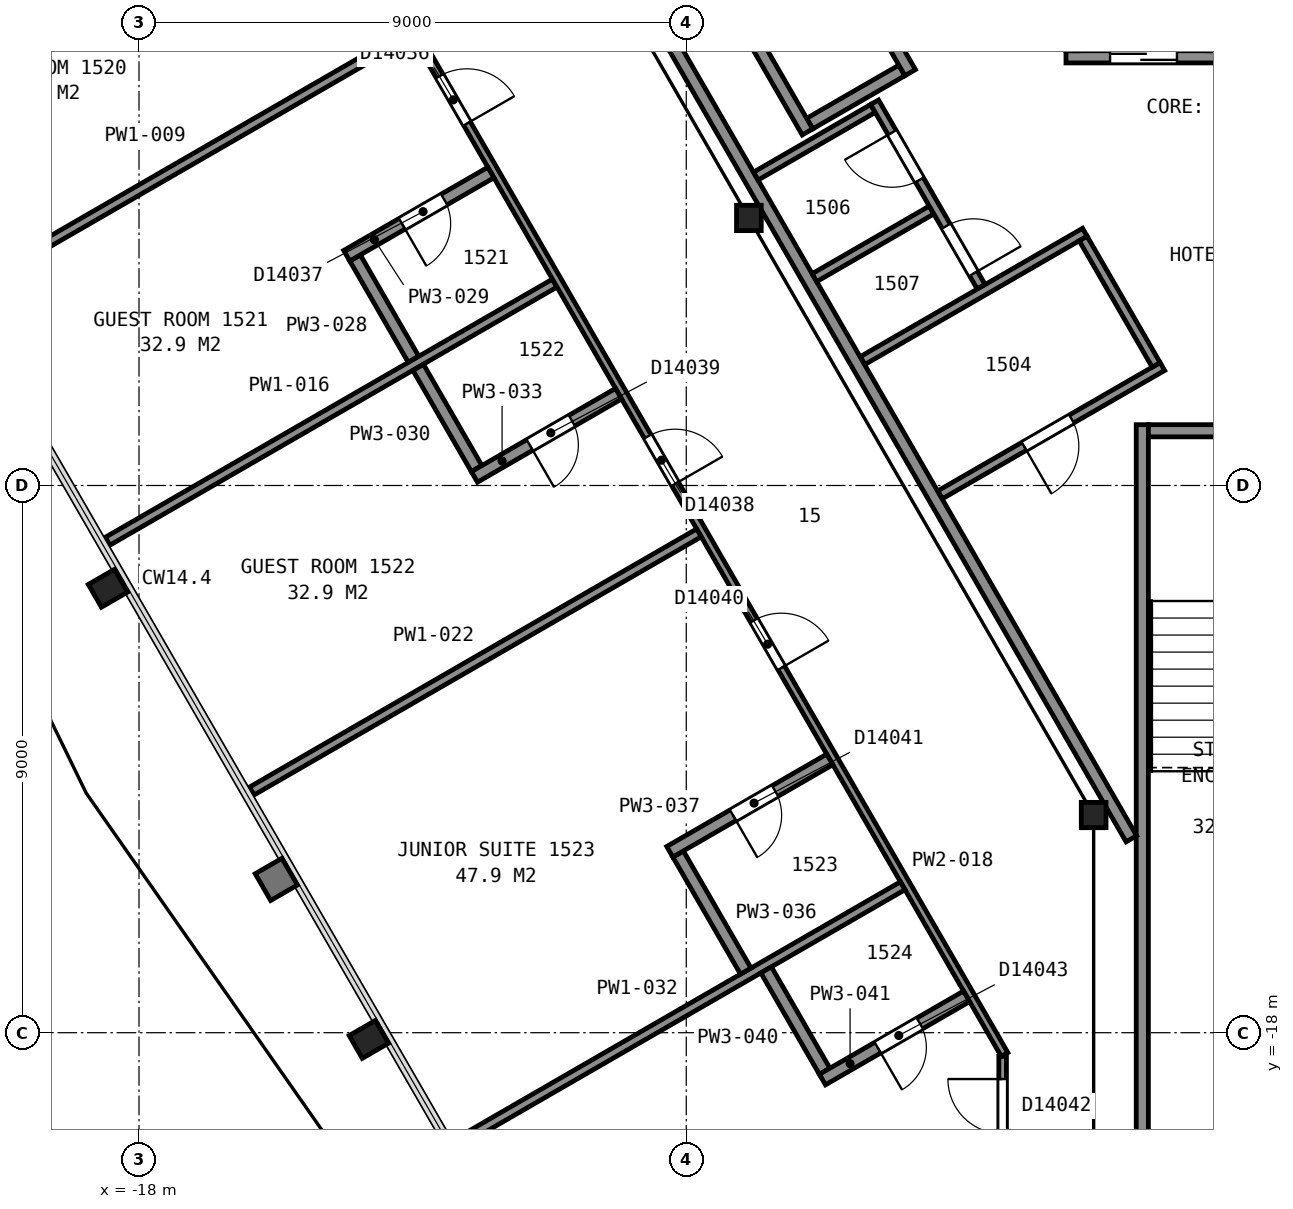
"""IFC4 building model, lengths in metres.
Left out: names, types, materials, properties, quantities, classifications, styles, units other than length and angle.
Written with IfcOpenShell. Run it as: python <this file> out.ifc"""

import sys

from ifc_helpers import new_model, si_unit, direction, frame, frame_2d, origin, origin_2d, place, context, subcontext, project, spatial, rectangle, i_section, extrude, element, fill, save


model = new_model("IFC4")
c1 = context("Model", 3, precision=1e-05, world=origin(), true_north=direction((0.0, 1.0)))
c2 = subcontext(c1, "Body", "Model", "MODEL_VIEW")
j1 = project(units=[si_unit("LENGTHUNIT", "METRE"), si_unit("PLANEANGLEUNIT", "RADIAN")], contexts=[c1])
p1 = place(None, origin())
s1 = spatial("IfcSite", under=j1, at=p1, CompositionType="ELEMENT")
p2 = place(p1, origin())
s2 = spatial("IfcBuilding", under=s1, at=p2, CompositionType="ELEMENT")
p3 = place(p2, frame((0.0, 0.0, 69.2)))
s3 = spatial("IfcBuildingStorey", under=s2, at=p3, CompositionType="ELEMENT", Elevation=69.2)
for number, where, z_axis, x_axis in (
    (1, (-18.51, -10.69, 0.0), (0.0, 0.0, 1.0), (-0.5, 0.866, 0.0)),
    (2, (-14.22, -18.11, 0.0), (0.0, 0.0, 1.0), (-0.5, 0.866, 0.0)),
):
    element("IfcColumn", number, at=place(p3, frame(where, z_axis=z_axis, x_axis=x_axis)), inside=s3, PredefinedType="COLUMN", context=c2, shape_type="SweptSolid", body=[
        extrude(i_section(OverallWidth=0.432, OverallDepth=0.498, WebThickness=0.056, FlangeThickness=0.089, FilletRadius=0.015, at=origin_2d()), origin(), (0.0, 0.0, 1.0), 3.575),
    ])
for number, where, z_axis, x_axis in (
    (3, (-7.97, -4.6, 0.0), (0.0, 0.0, 1.0), (1.0, 0.0, 0.0)),
    (4, (-2.3, -14.42, 0.0), (0.0, 0.0, 1.0), (1.0, 0.0, 0.0)),
):
    element("IfcColumn", number, at=place(p3, frame(where, z_axis=z_axis, x_axis=x_axis)), inside=s3, PredefinedType="COLUMN", context=c2, shape_type="SweptSolid", body=[
        extrude(i_section(OverallWidth=0.406, OverallDepth=0.417, WebThickness=0.03, FlangeThickness=0.048, FilletRadius=0.015, at=origin_2d()), origin(), (0.0, 0.0, 1.0), 3.6),
    ])
p4 = place(p3, frame((-1.5, -8.0, 0.0), z_axis=(0.0, 0.0, 1.0), x_axis=(0.0, -1.0, 0.0)))
e5 = element("IfcWall", 5, at=p4, inside=s3, PredefinedType="PARTITIONING", context=c2, shape_type="SweptSolid", body=[
    extrude(rectangle(XDim=12.0, YDim=0.2, at=frame_2d((6.0, 0.0))), origin(), (0.0, 0.0, 1.0), 3.35),
])
p5 = place(p3, frame((-1.4, -8.1, 0.0), z_axis=(0.0, 0.0, 1.0), x_axis=(1.0, 0.0, 0.0)))
e6 = element("IfcWall", 6, at=p5, inside=s3, PredefinedType="PARTITIONING", context=c2, shape_type="SweptSolid", body=[
    extrude(rectangle(XDim=2.8, YDim=0.2, at=frame_2d((1.4, 0.0))), origin(), (0.0, 0.0, 1.0), 3.35),
])
p6 = place(p3, frame((-2.755, -1.95, 0.0), z_axis=(0.0, 0.0, 1.0), x_axis=(1.0, 0.0, 0.0)))
e7 = element("IfcWall", 7, at=p6, inside=s3, PredefinedType="PARTITIONING", context=c2, shape_type="SweptSolid", body=[
    extrude(rectangle(XDim=2.55, YDim=0.2, at=frame_2d((1.275, 0.0))), origin(), (0.0, 0.0, 1.0), 3.6),
])
p7 = place(p6, frame((0.725, 0.0, 0.0)))
e8 = element("IfcOpeningElement", 8, at=p7, cuts=e7, PredefinedType="OPENING", context=c2, shape_type="SweptSolid", body=[
    extrude(rectangle(XDim=1.1, YDim=2.1, at=frame_2d((0.55, 1.05))), frame((0.0, 0.11, 0.0), z_axis=(0.0, -1.0, 0.0), x_axis=(1.0, 0.0, 0.0)), (0.0, 0.0, 1.0), 0.22),
])
p8 = place(p3, frame((-6.97, -3.048, 0.0), z_axis=(0.0, 0.0, 1.0), x_axis=(0.866036909293, 0.499980071345, 0.0)))
e9 = element("IfcWall", 9, at=p8, inside=s3, PredefinedType="PARTITIONING", context=c2, shape_type="SweptSolid", body=[
    extrude(rectangle(XDim=1.75, YDim=0.2, at=frame_2d((0.875, 0.0))), origin(), (0.0, 0.0, 1.0), 3.6),
])
p9 = place(p3, frame((-5.318, -2.21, 0.0), z_axis=(0.0, 0.0, 1.0), x_axis=(-0.499938297808, 0.866061024631, 0.0)))
e10 = element("IfcWall", 10, at=p9, inside=s3, PredefinedType="PARTITIONING", context=c2, shape_type="SweptSolid", body=[
    extrude(rectangle(XDim=2.35, YDim=0.2, at=frame_2d((1.175, 0.0))), origin(), (0.0, 0.0, 1.0), 3.6),
])
p10 = place(p3, frame((-7.006, -3.185, 0.0), z_axis=(0.0, 0.0, 1.0), x_axis=(-0.499990435942, 0.866030925526, 0.0)))
e11 = element("IfcWall", 11, at=p10, inside=s3, PredefinedType="PARTITIONING", context=c2, shape_type="SweptSolid", body=[
    extrude(rectangle(XDim=2.55, YDim=0.2, at=frame_2d((1.275, 0.0))), origin(), (0.0, 0.0, 1.0), 3.6),
])
p11 = place(p3, frame((-13.664, 5.946, 0.0), z_axis=(0.0, 0.0, 1.0), x_axis=(0.499994327219, -0.866028678941, 0.0)))
e12 = element("IfcWall", 12, at=p11, inside=s3, PredefinedType="PARTITIONING", context=c2, shape_type="SweptSolid", body=[
    extrude(rectangle(XDim=23.968, YDim=0.2, at=frame_2d((11.984, 0.0))), origin(), (0.0, 0.0, 1.0), 3.35),
])
p12 = place(p3, frame((-7.856, -3.912, 0.0), z_axis=(0.0, 0.0, 1.0), x_axis=(0.865971748, 0.500092923031, 0.0)))
e13 = element("IfcWall", 13, at=p12, inside=s3, PredefinedType="PARTITIONING", context=c2, shape_type="SweptSolid", body=[
    extrude(rectangle(XDim=2.225, YDim=0.15, at=frame_2d((1.112, 0.0))), origin(), (0.0, 0.0, 1.0), 3.35),
])
p13 = place(p3, frame((-6.892, -5.582, 0.0), z_axis=(0.0, 0.0, 1.0), x_axis=(0.865944298464, 0.500140452231, 0.0)))
e14 = element("IfcWall", 14, at=p13, inside=s3, PredefinedType="PARTITIONING", context=c2, shape_type="SweptSolid", body=[
    extrude(rectangle(XDim=2.224, YDim=0.15, at=frame_2d((1.112, 0.0))), origin(), (0.0, 0.0, 1.0), 3.35),
])
p14 = place(p3, frame((-6.1, -6.946, 0.0), z_axis=(0.0, 0.0, 1.0), x_axis=(0.866038200431, 0.499977834903, 0.0)))
e15 = element("IfcWall", 15, at=p14, inside=s3, PredefinedType="PARTITIONING", context=c2, shape_type="SweptSolid", body=[
    extrude(rectangle(XDim=4.22, YDim=0.15, at=frame_2d((2.11, 0.0))), origin(), (0.0, 0.0, 1.0), 3.35),
])
p15 = place(p3, frame((-4.152, -5.729, 0.0), z_axis=(0.0, 0.0, 1.0), x_axis=(-0.500024287448, 0.866011380966, 0.0)))
e16 = element("IfcWall", 16, at=p15, inside=s3, PredefinedType="PARTITIONING", context=c2, shape_type="SweptSolid", body=[
    extrude(rectangle(XDim=3.501, YDim=0.15, at=frame_2d((1.75, 0.0))), origin(), (0.0, 0.0, 1.0), 3.35),
])
p16 = place(p15, frame((2.026, 0.0, 0.0)))
e17 = element("IfcOpeningElement", 17, at=p16, cuts=e16, PredefinedType="OPENING", context=c2, shape_type="SweptSolid", body=[
    extrude(rectangle(XDim=0.9, YDim=2.1, at=frame_2d((0.45, 1.05))), frame((0.0, 0.085, 0.0), z_axis=(0.0, -1.0, 0.0), x_axis=(1.0, 0.0, 0.0)), (0.0, 0.0, 1.0), 0.17),
])
p17 = place(p15, frame((0.248, 0.0, 0.0)))
e18 = element("IfcOpeningElement", 18, at=p17, cuts=e16, PredefinedType="OPENING", context=c2, shape_type="SweptSolid", body=[
    extrude(rectangle(XDim=0.9, YDim=2.1, at=frame_2d((0.45, 1.05))), frame((0.0, 0.085, 0.0), z_axis=(0.0, -1.0, 0.0), x_axis=(1.0, 0.0, 0.0)), (0.0, 0.0, 1.0), 0.17),
])
p18 = place(p3, frame((-4.825, -9.154, 0.0), z_axis=(0.0, 0.0, 1.0), x_axis=(0.866023738697, 0.500002884005, 0.0)))
e19 = element("IfcWall", 19, at=p18, inside=s3, PredefinedType="PARTITIONING", context=c2, shape_type="SweptSolid", body=[
    extrude(rectangle(XDim=4.22, YDim=0.15, at=frame_2d((2.11, 0.0))), origin(), (0.0, 0.0, 1.0), 3.35),
])
p19 = place(p18, frame((1.595, 0.0, 0.0)))
e20 = element("IfcOpeningElement", 20, at=p19, cuts=e19, PredefinedType="OPENING", context=c2, shape_type="SweptSolid", body=[
    extrude(rectangle(XDim=0.9, YDim=2.1, at=frame_2d((0.45, 1.05))), frame((0.0, 0.085, 0.0), z_axis=(0.0, -1.0, 0.0), x_axis=(1.0, 0.0, 0.0)), (0.0, 0.0, 1.0), 0.17),
])
p20 = place(p3, frame((-2.472, -4.938, 0.0), z_axis=(0.0, 0.0, 1.0), x_axis=(0.500045362686, -0.865999212041, 0.0)))
e21 = element("IfcWall", 21, at=p20, inside=s3, PredefinedType="PARTITIONING", context=c2, shape_type="SweptSolid", body=[
    extrude(rectangle(XDim=2.4, YDim=0.15, at=frame_2d((1.2, 0.0))), origin(), (0.0, 0.0, 1.0), 3.35),
])
p21 = place(p3, frame((-20.889, -5.809, 0.0), z_axis=(0.0, 0.0, 1.0), x_axis=(0.866022790583, 0.50000452617, 0.0)))
e22 = element("IfcWall", 22, at=p21, inside=s3, PredefinedType="PARTITIONING", context=c2, shape_type="SweptSolid", body=[
    extrude(rectangle(XDim=8.491, YDim=0.15, at=frame_2d((4.246, 0.0))), origin(), (0.0, 0.0, 1.0), 2.613),
])
p22 = place(p3, frame((-18.517, -9.917, 0.0), z_axis=(0.0, 0.0, 1.0), x_axis=(0.866017528739, 0.50001363973, 0.0)))
e23 = element("IfcWall", 23, at=p22, inside=s3, PredefinedType="PARTITIONING", context=c2, shape_type="SweptSolid", body=[
    extrude(rectangle(XDim=8.491, YDim=0.15, at=frame_2d((4.246, 0.0))), origin(), (0.0, 0.0, 1.0), 2.613),
])
p23 = place(p3, frame((-3.766, -18.358, 0.0), z_axis=(0.0, 0.0, 1.0), x_axis=(-0.500003973642, 0.866023109589, 0.0)))
e24 = element("IfcWall", 24, at=p23, inside=s3, PredefinedType="PARTITIONING", context=c2, shape_type="SweptSolid", body=[
    extrude(rectangle(XDim=28.826, YDim=0.125, at=frame_2d((14.413, 0.0))), origin(), (0.0, 0.0, 1.0), 2.613),
])
p24 = place(p23, frame((27.114, 0.0, 0.0)))
e25 = element("IfcOpeningElement", 25, at=p24, cuts=e24, PredefinedType="OPENING", context=c2, shape_type="SweptSolid", body=[
    extrude(rectangle(XDim=0.9, YDim=2.1, at=frame_2d((0.45, 1.05))), frame((0.0, 0.073, 0.0), z_axis=(0.0, -1.0, 0.0), x_axis=(1.0, 0.0, 0.0)), (0.0, 0.0, 1.0), 0.145),
])
p25 = place(p23, frame((20.322, 0.0, 0.0)))
e26 = element("IfcOpeningElement", 26, at=p25, cuts=e24, PredefinedType="OPENING", context=c2, shape_type="SweptSolid", body=[
    extrude(rectangle(XDim=0.9, YDim=2.1, at=frame_2d((0.45, 1.05))), frame((0.0, 0.073, 0.0), z_axis=(0.0, -1.0, 0.0), x_axis=(1.0, 0.0, 0.0)), (0.0, 0.0, 1.0), 0.145),
])
p26 = place(p23, frame((17.68, 0.0, 0.0)))
e27 = element("IfcOpeningElement", 27, at=p26, cuts=e24, PredefinedType="OPENING", context=c2, shape_type="SweptSolid", body=[
    extrude(rectangle(XDim=0.9, YDim=2.1, at=frame_2d((0.45, 1.05))), frame((0.0, 0.073, 0.0), z_axis=(0.0, -1.0, 0.0), x_axis=(1.0, 0.0, 0.0)), (0.0, 0.0, 1.0), 0.145),
])
p27 = place(p23, frame((10.836, 0.0, 0.0)))
e28 = element("IfcOpeningElement", 28, at=p27, cuts=e24, PredefinedType="OPENING", context=c2, shape_type="SweptSolid", body=[
    extrude(rectangle(XDim=0.9, YDim=2.1, at=frame_2d((0.45, 1.05))), frame((0.0, 0.073, 0.0), z_axis=(0.0, -1.0, 0.0), x_axis=(1.0, 0.0, 0.0)), (0.0, 0.0, 1.0), 0.145),
])
p28 = place(p23, frame((7.342, 0.0, 0.0)))
e29 = element("IfcOpeningElement", 29, at=p28, cuts=e24, PredefinedType="OPENING", context=c2, shape_type="SweptSolid", body=[
    extrude(rectangle(XDim=0.9, YDim=2.1, at=frame_2d((0.45, 1.05))), frame((0.0, 0.073, 0.0), z_axis=(0.0, -1.0, 0.0), x_axis=(1.0, 0.0, 0.0)), (0.0, 0.0, 1.0), 0.145),
])
p29 = place(p3, frame((-16.145, -14.025, 0.0), z_axis=(0.0, 0.0, 1.0), x_axis=(0.866024716685, 0.500001190089, 0.0)))
e30 = element("IfcWall", 30, at=p29, inside=s3, PredefinedType="PARTITIONING", context=c2, shape_type="SweptSolid", body=[
    extrude(rectangle(XDim=8.492, YDim=0.15, at=frame_2d((4.246, 0.0))), origin(), (0.0, 0.0, 1.0), 2.613),
])
p30 = place(p3, frame((-14.447, -5.258, 0.0), z_axis=(0.0, 0.0, 1.0), x_axis=(0.499667418833, -0.866217334482, 0.0)))
e31 = element("IfcWall", 31, at=p30, inside=s3, PredefinedType="PARTITIONING", context=c2, shape_type="SweptSolid", body=[
    extrude(rectangle(XDim=1.92, YDim=0.2, at=frame_2d((0.96, 0.0))), origin(), (0.0, 0.0, 1.0), 2.613),
])
p31 = place(p3, frame((-12.213, -3.852, 0.0), z_axis=(0.0, 0.0, 1.0), x_axis=(-0.866005850709, -0.50003386539, 0.0)))
e32 = element("IfcWall", 32, at=p31, inside=s3, PredefinedType="PARTITIONING", context=c2, shape_type="SweptSolid", body=[
    extrude(rectangle(XDim=2.737, YDim=0.2, at=frame_2d((1.369, 0.0))), origin(), (0.0, 0.0, 1.0), 2.613),
])
p32 = place(p31, frame((0.887, 0.0, 0.0)))
e33 = element("IfcOpeningElement", 33, at=p32, cuts=e32, PredefinedType="OPENING", context=c2, shape_type="SweptSolid", body=[
    extrude(rectangle(XDim=0.8, YDim=2.1, at=frame_2d((0.4, 1.05))), frame((0.0, 0.11, 0.0), z_axis=(0.0, -1.0, 0.0), x_axis=(1.0, 0.0, 0.0)), (0.0, 0.0, 1.0), 0.22),
])
p33 = place(p3, frame((-13.407, -7.059, 0.0), z_axis=(0.0, 0.0, 1.0), x_axis=(0.499993829411, -0.866028966346, 0.0)))
e34 = element("IfcWall", 34, at=p33, inside=s3, PredefinedType="PARTITIONING", context=c2, shape_type="SweptSolid", body=[
    extrude(rectangle(XDim=1.921, YDim=0.2, at=frame_2d((0.96, 0.0))), origin(), (0.0, 0.0, 1.0), 2.613),
])
p34 = place(p3, frame((-12.794, -19.829, 0.0), z_axis=(0.0, 0.0, 1.0), x_axis=(0.866024716685, 0.500001190089, 0.0)))
e35 = element("IfcWall", 35, at=p34, inside=s3, PredefinedType="PARTITIONING", context=c2, shape_type="SweptSolid", body=[
    extrude(rectangle(XDim=8.492, YDim=0.15, at=frame_2d((4.246, 0.0))), origin(), (0.0, 0.0, 1.0), 2.613),
])
p35 = place(p3, frame((-12.484, -8.859, 0.0), z_axis=(0.0, 0.0, 1.0), x_axis=(0.866028150195, 0.499995243048, 0.0)))
e36 = element("IfcWall", 36, at=p35, inside=s3, PredefinedType="PARTITIONING", context=c2, shape_type="SweptSolid", body=[
    extrude(rectangle(XDim=2.737, YDim=0.2, at=frame_2d((1.369, 0.0))), origin(), (0.0, 0.0, 1.0), 2.613),
])
p36 = place(p35, frame((1.05, 0.0, 0.0)))
e37 = element("IfcOpeningElement", 37, at=p36, cuts=e36, PredefinedType="OPENING", context=c2, shape_type="SweptSolid", body=[
    extrude(rectangle(XDim=0.8, YDim=2.1, at=frame_2d((0.4, 1.05))), frame((0.0, 0.11, 0.0), z_axis=(0.0, -1.0, 0.0), x_axis=(1.0, 0.0, 0.0)), (0.0, 0.0, 1.0), 0.22),
])
p37 = place(p3, frame((-9.134, -15.061, 0.0), z_axis=(0.0, 0.0, 1.0), x_axis=(0.500092923031, -0.865971748, 0.0)))
e38 = element("IfcWall", 38, at=p37, inside=s3, PredefinedType="PARTITIONING", context=c2, shape_type="SweptSolid", body=[
    extrude(rectangle(XDim=2.225, YDim=0.2, at=frame_2d((1.112, 0.0))), origin(), (0.0, 0.0, 1.0), 2.613),
])
p38 = place(p3, frame((-6.64, -13.505, 0.0), z_axis=(0.0, 0.0, 1.0), x_axis=(-0.866038344573, -0.499977585228, 0.0)))
e39 = element("IfcWall", 39, at=p38, inside=s3, PredefinedType="PARTITIONING", context=c2, shape_type="SweptSolid", body=[
    extrude(rectangle(XDim=3.037, YDim=0.2, at=frame_2d((1.519, 0.0))), origin(), (0.0, 0.0, 1.0), 2.613),
])
p39 = place(p38, frame((1.037, 0.0, 0.0)))
e40 = element("IfcOpeningElement", 40, at=p39, cuts=e39, PredefinedType="OPENING", context=c2, shape_type="SweptSolid", body=[
    extrude(rectangle(XDim=0.8, YDim=2.1, at=frame_2d((0.4, 1.05))), frame((0.0, 0.11, 0.0), z_axis=(0.0, -1.0, 0.0), x_axis=(1.0, 0.0, 0.0)), (0.0, 0.0, 1.0), 0.22),
])
p40 = place(p3, frame((-7.687, -16.967, 0.0), z_axis=(0.0, 0.0, 1.0), x_axis=(0.500026156197, -0.86601030197, 0.0)))
e41 = element("IfcWall", 41, at=p40, inside=s3, PredefinedType="PARTITIONING", context=c2, shape_type="SweptSolid", body=[
    extrude(rectangle(XDim=1.925, YDim=0.2, at=frame_2d((0.963, 0.0))), origin(), (0.0, 0.0, 1.0), 2.613),
])
p41 = place(p3, frame((-6.76, -18.771, 0.0), z_axis=(0.0, 0.0, 1.0), x_axis=(0.866005850709, 0.50003386539, 0.0)))
e42 = element("IfcWall", 42, at=p41, inside=s3, PredefinedType="PARTITIONING", context=c2, shape_type="SweptSolid", body=[
    extrude(rectangle(XDim=2.737, YDim=0.2, at=frame_2d((1.369, 0.0))), origin(), (0.0, 0.0, 1.0), 2.613),
])
p42 = place(p41, frame((1.05, 0.0, 0.0)))
e43 = element("IfcOpeningElement", 43, at=p42, cuts=e42, PredefinedType="OPENING", context=c2, shape_type="SweptSolid", body=[
    extrude(rectangle(XDim=0.8, YDim=2.1, at=frame_2d((0.4, 1.05))), frame((0.0, 0.11, 0.0), z_axis=(0.0, -1.0, 0.0), x_axis=(1.0, 0.0, 0.0)), (0.0, 0.0, 1.0), 0.22),
])
p43 = place(p3, frame((-3.797, -22.86, 0.0), z_axis=(0.0, 0.0, 1.0), x_axis=(0.0, 1.0, 0.0)))
e44 = element("IfcWall", 44, at=p43, inside=s3, PredefinedType="PARTITIONING", context=c2, shape_type="SweptSolid", body=[
    extrude(rectangle(XDim=4.471, YDim=0.125, at=frame_2d((2.235, 0.0))), origin(), (0.0, 0.0, 1.0), 2.613),
])
p44 = place(p43, frame((3.198, 0.0, 0.0)))
e45 = element("IfcOpeningElement", 45, at=p44, cuts=e44, PredefinedType="OPENING", context=c2, shape_type="SweptSolid", body=[
    extrude(rectangle(XDim=0.9, YDim=2.1, at=frame_2d((0.45, 1.05))), frame((0.0, 0.073, 0.0), z_axis=(0.0, -1.0, 0.0), x_axis=(1.0, 0.0, 0.0)), (0.0, 0.0, 1.0), 0.145),
])
p45 = place(p7, origin())
e46 = element("IfcDoor", 46, at=p45, inside=s3, OperationType="SLIDING_TO_RIGHT", PredefinedType="DOOR", context=c2, shape_type="SweptSolid", body=[
    extrude(rectangle(XDim=1.1, YDim=2.1, at=frame_2d((0.55, 1.05))), frame((0.0, 0.025, 0.0), z_axis=(0.0, -1.0, 0.0), x_axis=(1.0, 0.0, 0.0)), (0.0, 0.0, 1.0), 0.05),
])
fill(e8, e46)
p46 = place(p16, origin())
e47 = element("IfcDoor", 47, at=p46, inside=s3, OperationType="SINGLE_SWING_RIGHT", PredefinedType="DOOR", context=c2, shape_type="SweptSolid", body=[
    extrude(rectangle(XDim=0.9, YDim=2.1, at=frame_2d((0.45, 1.05))), frame((0.0, 0.025, 0.0), z_axis=(0.0, -1.0, 0.0), x_axis=(1.0, 0.0, 0.0)), (0.0, 0.0, 1.0), 0.05),
])
fill(e17, e47)
p47 = place(p17, origin())
e48 = element("IfcDoor", 48, at=p47, inside=s3, OperationType="SINGLE_SWING_LEFT", PredefinedType="DOOR", context=c2, shape_type="SweptSolid", body=[
    extrude(rectangle(XDim=0.9, YDim=2.1, at=frame_2d((0.45, 1.05))), frame((0.0, 0.025, 0.0), z_axis=(0.0, -1.0, 0.0), x_axis=(1.0, 0.0, 0.0)), (0.0, 0.0, 1.0), 0.05),
])
fill(e18, e48)
p48 = place(p19, origin())
e49 = element("IfcDoor", 49, at=p48, inside=s3, OperationType="SINGLE_SWING_LEFT", PredefinedType="DOOR", context=c2, shape_type="SweptSolid", body=[
    extrude(rectangle(XDim=0.9, YDim=2.1, at=frame_2d((0.45, 1.05))), frame((0.0, 0.025, 0.0), z_axis=(0.0, -1.0, 0.0), x_axis=(1.0, 0.0, 0.0)), (0.0, 0.0, 1.0), 0.05),
])
fill(e20, e49)
p49 = place(p26, origin())
e50 = element("IfcDoor", 50, at=p49, inside=s3, OperationType="SINGLE_SWING_LEFT", PredefinedType="DOOR", context=c2, shape_type="SweptSolid", body=[
    extrude(rectangle(XDim=0.9, YDim=2.1, at=frame_2d((0.45, 1.05))), frame((0.0, 0.025, 0.0), z_axis=(0.0, -1.0, 0.0), x_axis=(1.0, 0.0, 0.0)), (0.0, 0.0, 1.0), 0.05),
])
fill(e27, e50)
p50 = place(p27, origin())
e51 = element("IfcDoor", 51, at=p50, inside=s3, OperationType="SINGLE_SWING_LEFT", PredefinedType="DOOR", context=c2, shape_type="SweptSolid", body=[
    extrude(rectangle(XDim=0.9, YDim=2.1, at=frame_2d((0.45, 1.05))), frame((0.0, 0.025, 0.0), z_axis=(0.0, -1.0, 0.0), x_axis=(1.0, 0.0, 0.0)), (0.0, 0.0, 1.0), 0.05),
])
fill(e28, e51)
p51 = place(p28, origin())
e52 = element("IfcDoor", 52, at=p51, inside=s3, OperationType="SINGLE_SWING_LEFT", PredefinedType="DOOR", context=c2, shape_type="SweptSolid", body=[
    extrude(rectangle(XDim=0.9, YDim=2.1, at=frame_2d((0.45, 1.05))), frame((0.0, 0.025, 0.0), z_axis=(0.0, -1.0, 0.0), x_axis=(1.0, 0.0, 0.0)), (0.0, 0.0, 1.0), 0.05),
])
fill(e29, e52)
p52 = place(p32, origin())
e53 = element("IfcDoor", 53, at=p52, inside=s3, OperationType="SINGLE_SWING_RIGHT", PredefinedType="DOOR", context=c2, shape_type="SweptSolid", body=[
    extrude(rectangle(XDim=0.8, YDim=2.1, at=frame_2d((0.4, 1.05))), frame((0.0, 0.025, 0.0), z_axis=(0.0, -1.0, 0.0), x_axis=(1.0, 0.0, 0.0)), (0.0, 0.0, 1.0), 0.05),
])
fill(e33, e53)
p53 = place(p36, origin())
e54 = element("IfcDoor", 54, at=p53, inside=s3, OperationType="SINGLE_SWING_LEFT", PredefinedType="DOOR", context=c2, shape_type="SweptSolid", body=[
    extrude(rectangle(XDim=0.8, YDim=2.1, at=frame_2d((0.4, 1.05))), frame((0.0, 0.025, 0.0), z_axis=(0.0, -1.0, 0.0), x_axis=(1.0, 0.0, 0.0)), (0.0, 0.0, 1.0), 0.05),
])
fill(e37, e54)
p54 = place(p39, origin())
e55 = element("IfcDoor", 55, at=p54, inside=s3, OperationType="SINGLE_SWING_RIGHT", PredefinedType="DOOR", context=c2, shape_type="SweptSolid", body=[
    extrude(rectangle(XDim=0.8, YDim=2.1, at=frame_2d((0.4, 1.05))), frame((0.0, 0.025, 0.0), z_axis=(0.0, -1.0, 0.0), x_axis=(1.0, 0.0, 0.0)), (0.0, 0.0, 1.0), 0.05),
])
fill(e40, e55)
p55 = place(p42, origin())
e56 = element("IfcDoor", 56, at=p55, inside=s3, OperationType="SINGLE_SWING_LEFT", PredefinedType="DOOR", context=c2, shape_type="SweptSolid", body=[
    extrude(rectangle(XDim=0.8, YDim=2.1, at=frame_2d((0.4, 1.05))), frame((0.0, 0.025, 0.0), z_axis=(0.0, -1.0, 0.0), x_axis=(1.0, 0.0, 0.0)), (0.0, 0.0, 1.0), 0.05),
])
fill(e43, e56)
p56 = place(p44, origin())
e57 = element("IfcDoor", 57, at=p56, inside=s3, OperationType="SINGLE_SWING_RIGHT", PredefinedType="DOOR", context=c2, shape_type="SweptSolid", body=[
    extrude(rectangle(XDim=0.9, YDim=2.1, at=frame_2d((0.45, 1.05))), frame((0.0, 0.025, 0.0), z_axis=(0.0, -1.0, 0.0), x_axis=(1.0, 0.0, 0.0)), (0.0, 0.0, 1.0), 0.05),
])
fill(e45, e57)
save(model, sys.argv[1])
